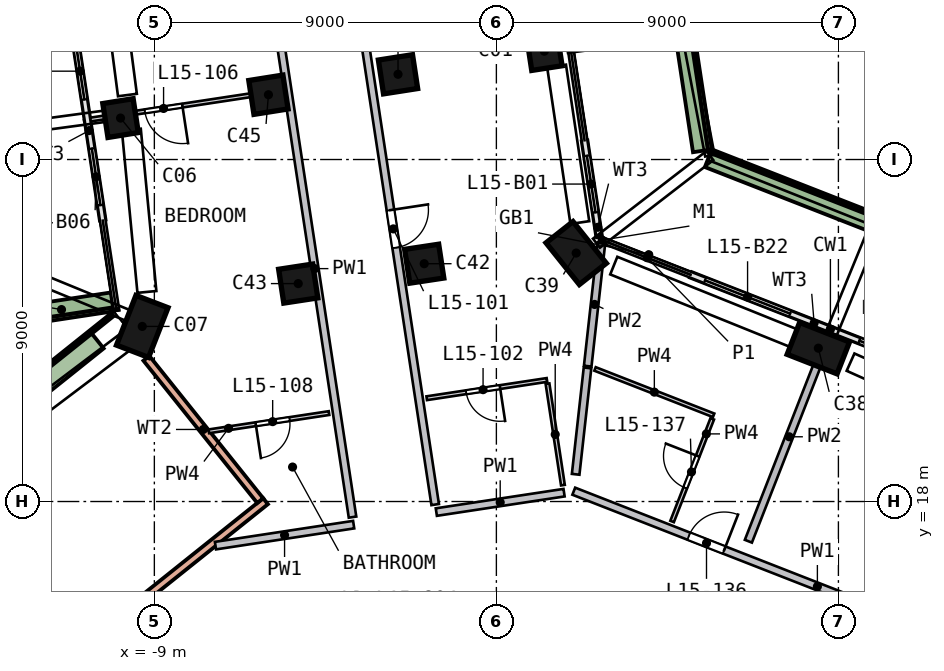
"""IFC4 building model, lengths in metres.
Left out: names, types, materials, properties, quantities, classifications, styles, units other than length and angle.
Written with IfcOpenShell. Run it as: python <this file> out.ifc"""

import sys

from ifc_helpers import new_model, si_unit, direction, frame, frame_2d, origin, origin_2d, place, context, subcontext, project, spatial, rectangle, extrude, element, fill, save


model = new_model("IFC4")
c1 = context("Model", 3, precision=1e-05, world=origin(), true_north=direction((0.0, 1.0)))
c2 = subcontext(c1, "Body", "Model", "MODEL_VIEW")
j1 = project(units=[si_unit("LENGTHUNIT", "METRE"), si_unit("PLANEANGLEUNIT", "RADIAN")], contexts=[c1])
p1 = place(None, origin())
s1 = spatial("IfcSite", under=j1, at=p1, CompositionType="ELEMENT")
p2 = place(p1, origin())
s2 = spatial("IfcBuilding", under=s1, at=p2, CompositionType="ELEMENT")
p3 = place(p2, frame((0.0, 0.0, 68.0)))
s3 = spatial("IfcBuildingStorey", under=s2, at=p3, CompositionType="ELEMENT", Elevation=68.0)
p4 = place(p3, frame((1.426, 29.891, 0.0), z_axis=(-0.13520716, -0.033347057, 0.990256026), x_axis=(-0.152178078, 0.988274013, 0.012502286)))
e1 = element("IfcColumn", 1, at=p4, inside=s3, PredefinedType="COLUMN", context=c2, shape_type="SweptSolid", body=[
    extrude(rectangle(XDim=0.9, YDim=0.8, at=origin_2d()), origin(), (0.0, 0.0, 1.0), 3.221),
])
p5 = place(p3, frame((-9.736, 28.195, 0.0), z_axis=(-0.126460455, -0.085996135, 0.988237025), x_axis=(0.158944012, -0.985120062, -0.065385514)))
e2 = element("IfcColumn", 2, at=p5, inside=s3, PredefinedType="COLUMN", context=c2, shape_type="SweptSolid", body=[
    extrude(rectangle(XDim=0.9, YDim=0.8, at=origin_2d()), origin(), (0.0, 0.0, 1.0), 3.228),
])
p6 = place(p3, frame((-9.189, 22.662, 0.0), z_axis=(-0.107334537, -0.044545353, 0.993224551), x_axis=(0.35692807, 0.930673053, 0.080312019)))
e3 = element("IfcColumn", 3, at=p6, inside=s3, PredefinedType="COLUMN", context=c2, shape_type="SweptSolid", body=[
    extrude(rectangle(XDim=1.4, YDim=0.9, at=origin_2d()), origin(), (0.0, 0.0, 1.0), 3.212),
])
p7 = place(p3, frame((8.599, 21.987, 0.0), z_axis=(-0.104949359, 0.040002437, 0.993672701), x_axis=(-0.925474949, 0.361776799, -0.112310579)))
e4 = element("IfcColumn", 4, at=p7, inside=s3, PredefinedType="COLUMN", context=c2, shape_type="SweptSolid", body=[
    extrude(rectangle(XDim=1.4, YDim=0.9, at=origin_2d()), origin(), (0.0, 0.0, 1.0), 3.21),
])
p8 = place(p3, frame((2.241, 24.527, 0.0), z_axis=(-0.116747517, 0.00972896, 0.993113974), x_axis=(0.616715127, -0.783093296, 0.080170701)))
e5 = element("IfcColumn", 5, at=p8, inside=s3, PredefinedType="COLUMN", context=c2, shape_type="SweptSolid", body=[
    extrude(rectangle(XDim=1.4, YDim=0.9, at=origin_2d()), origin(), (0.0, 0.0, 1.0), 3.212),
])
for number, where, z_axis, x_axis in (
    (6, (-1.76, 24.269, 0.0), (-0.115, -0.009, 0.993), (-0.149, 0.989, -0.008)),
    (7, (-5.078, 23.765, 0.0), (-0.113, -0.025, 0.993), (-0.151, 0.988, 0.008)),
):
    element("IfcColumn", number, at=place(p3, frame(where, z_axis=z_axis, x_axis=x_axis)), inside=s3, PredefinedType="COLUMN", context=c2, shape_type="SweptSolid", body=[
        extrude(rectangle(XDim=0.9, YDim=0.9, at=origin_2d()), origin(), (0.0, 0.0, 1.0), 3.211),
    ])
p9 = place(p3, frame((-2.428, 29.305, 0.0), z_axis=(-0.132201605, -0.051516958, 0.989883194), x_axis=(-0.154308616, 0.987542922, 0.030786825)))
e8 = element("IfcColumn", 8, at=p9, inside=s3, PredefinedType="COLUMN", context=c2, shape_type="SweptSolid", body=[
    extrude(rectangle(XDim=0.9, YDim=0.9, at=origin_2d()), origin(), (0.0, 0.0, 1.0), 3.223),
])
p10 = place(p3, frame((-5.841, 28.787, 0.0), z_axis=(-0.129544243, -0.067687056, 0.98926071), x_axis=(-0.156761028, 0.986518959, 0.046971516)))
e9 = element("IfcColumn", 9, at=p10, inside=s3, PredefinedType="COLUMN", context=c2, shape_type="SweptSolid", body=[
    extrude(rectangle(XDim=0.9, YDim=0.9, at=origin_2d()), origin(), (0.0, 0.0, 1.0), 3.225),
])
p11 = place(p3, frame((2.697, 25.017, 0.0), z_axis=(0.0, 0.0, 1.0), x_axis=(-0.150172469, 0.988659815, 0.0)))
e10 = element("IfcWall", 10, at=p11, inside=s3, PredefinedType="SOLIDWALL", context=c2, shape_type="SweptSolid", body=[
    extrude(rectangle(XDim=2.502, YDim=0.15, at=frame_2d((1.251, 0.0))), origin(), (0.0, 0.0, 1.0), 2.425),
])
p12 = place(p11, frame((0.602, 0.0, 0.0)))
e11 = element("IfcOpeningElement", 11, at=p12, cuts=e10, PredefinedType="OPENING", context=c2, shape_type="SweptSolid", body=[
    extrude(rectangle(XDim=1.5, YDim=2.4, at=frame_2d((0.75, 1.2))), frame((0.0, 0.085, 0.0), z_axis=(0.0, -1.0, 0.0), x_axis=(1.0, 0.0, 0.0)), (0.0, 0.0, 1.0), 0.17),
])
p13 = place(p3, frame((-11.127, 30.462, 0.0), z_axis=(0.0, 0.0, 1.0), x_axis=(0.150274727, -0.988644277, 0.0)))
e12 = element("IfcWall", 12, at=p13, inside=s3, PredefinedType="SOLIDWALL", context=c2, shape_type="SweptSolid", body=[
    extrude(rectangle(XDim=2.45, YDim=0.15, at=frame_2d((1.225, 0.0))), origin(), (0.0, 0.0, 1.0), 2.425),
])
p14 = place(p13, frame((0.4, 0.0, 0.0)))
e13 = element("IfcOpeningElement", 13, at=p14, cuts=e12, PredefinedType="OPENING", context=c2, shape_type="SweptSolid", body=[
    extrude(rectangle(XDim=1.5, YDim=2.4, at=frame_2d((0.75, 1.2))), frame((0.0, 0.085, 0.0), z_axis=(0.0, -1.0, 0.0), x_axis=(1.0, 0.0, 0.0)), (0.0, 0.0, 1.0), 0.17),
])
p15 = place(p3, frame((-10.759, 28.04, 0.0), z_axis=(0.0, 0.0, 1.0), x_axis=(0.150169285, -0.988660299, 0.0)))
e14 = element("IfcWall", 14, at=p15, inside=s3, PredefinedType="SOLIDWALL", context=c2, shape_type="SweptSolid", body=[
    extrude(rectangle(XDim=2.663, YDim=0.15, at=frame_2d((1.332, 0.0))), origin(), (0.0, 0.0, 1.0), 2.425),
])
p16 = place(p15, frame((0.763, 0.0, 0.0)))
e15 = element("IfcOpeningElement", 15, at=p16, cuts=e14, PredefinedType="OPENING", context=c2, shape_type="SweptSolid", body=[
    extrude(rectangle(XDim=1.5, YDim=2.4, at=frame_2d((0.75, 1.2))), frame((0.0, 0.085, 0.0), z_axis=(0.0, -1.0, 0.0), x_axis=(1.0, 0.0, 0.0)), (0.0, 0.0, 1.0), 0.17),
])
p17 = place(p3, frame((12.161, 21.211, 0.0), z_axis=(0.0, 0.0, 1.0), x_axis=(-0.931306801, 0.364235697, 0.0)))
e16 = element("IfcWall", 16, at=p17, inside=s3, PredefinedType="SOLIDWALL", context=c2, shape_type="SweptSolid", body=[
    extrude(rectangle(XDim=3.6, YDim=0.15, at=frame_2d((1.8, 0.0))), origin(), (0.0, 0.0, 1.0), 2.425),
])
p18 = place(p17, frame((0.4, 0.0, 0.0)))
e17 = element("IfcOpeningElement", 17, at=p18, cuts=e16, PredefinedType="OPENING", context=c2, shape_type="SweptSolid", body=[
    extrude(rectangle(XDim=2.4, YDim=2.4, at=frame_2d((1.2, 1.2))), frame((0.0, 0.085, 0.0), z_axis=(0.0, -1.0, 0.0), x_axis=(1.0, 0.0, 0.0)), (0.0, 0.0, 1.0), 0.17),
])
p19 = place(p3, frame((8.808, 22.522, 0.0), z_axis=(0.0, 0.0, 1.0), x_axis=(-0.931314617, 0.364215712, 0.0)))
e18 = element("IfcWall", 18, at=p19, inside=s3, PredefinedType="SOLIDWALL", context=c2, shape_type="SweptSolid", body=[
    extrude(rectangle(XDim=3.96, YDim=0.15, at=frame_2d((1.98, 0.0))), origin(), (0.0, 0.0, 1.0), 2.425),
])
p20 = place(p19, frame((1.16, 0.0, 0.0)))
e19 = element("IfcOpeningElement", 19, at=p20, cuts=e18, PredefinedType="OPENING", context=c2, shape_type="SweptSolid", body=[
    extrude(rectangle(XDim=2.4, YDim=2.4, at=frame_2d((1.2, 1.2))), frame((0.0, 0.085, 0.0), z_axis=(0.0, -1.0, 0.0), x_axis=(1.0, 0.0, 0.0)), (0.0, 0.0, 1.0), 0.17),
])
p21 = place(p3, frame((-12.777, 22.848, 0.0), z_axis=(0.0, 0.0, 1.0), x_axis=(0.988649233, 0.15024212, 0.0)))
e20 = element("IfcWall", 20, at=p21, inside=s3, PredefinedType="SOLIDWALL", context=c2, shape_type="SweptSolid", body=[
    extrude(rectangle(XDim=2.699, YDim=0.5, at=frame_2d((1.35, 0.0))), origin(), (0.0, 0.0, 1.0), 0.7),
])
p22 = place(p3, frame((15.498, 23.154, 0.0), z_axis=(0.0, 0.0, 1.0), x_axis=(-0.931310055, 0.364227375, 0.0)))
e21 = element("IfcWall", 21, at=p22, inside=s3, PredefinedType="SOLIDWALL", context=c2, shape_type="SweptSolid", body=[
    extrude(rectangle(XDim=10.652, YDim=0.5, at=frame_2d((5.326, 0.0))), origin(), (0.0, 0.0, 1.0), 0.7),
])
p23 = place(p3, frame((5.421, 27.229, 0.0), z_axis=(0.0, 0.0, 1.0), x_axis=(-0.150219629, 0.98865265, 0.0)))
e22 = element("IfcWall", 22, at=p23, inside=s3, PredefinedType="SOLIDWALL", context=c2, shape_type="SweptSolid", body=[
    extrude(rectangle(XDim=13.39, YDim=0.5, at=frame_2d((6.695, 0.0))), origin(), (0.0, 0.0, 1.0), 0.7),
])
p24 = place(p3, frame((-16.228, 9.89, 0.0), z_axis=(0.0, 0.0, 1.0), x_axis=(0.781086795, 0.624422468, 0.0)))
e23 = element("IfcWall", 23, at=p24, inside=s3, PredefinedType="SOLIDWALL", context=c2, shape_type="SweptSolid", body=[
    extrude(rectangle(XDim=13.0, YDim=0.2, at=frame_2d((6.5, 0.0))), origin(), (0.0, 0.0, 1.0), 3.19),
])
p25 = place(p24, frame((5.6, 0.0, 0.0)))
e24 = element("IfcOpeningElement", 24, at=p25, cuts=e23, PredefinedType="OPENING", context=c2, shape_type="SweptSolid", body=[
    extrude(rectangle(XDim=1.8, YDim=2.4, at=frame_2d((0.9, 1.2))), frame((0.0, 0.11, 0.0), z_axis=(0.0, -1.0, 0.0), x_axis=(1.0, 0.0, 0.0)), (0.0, 0.0, 1.0), 0.22),
])
p26 = place(p3, frame((-9.209, 21.769, 0.0), z_axis=(0.0, 0.0, 1.0), x_axis=(0.624409437, -0.781097212, 0.0)))
e25 = element("IfcWall", 25, at=p26, inside=s3, PredefinedType="SOLIDWALL", context=c2, shape_type="SweptSolid", body=[
    extrude(rectangle(XDim=4.796, YDim=0.2, at=frame_2d((2.398, 0.0))), origin(), (0.0, 0.0, 1.0), 3.19),
])
p27 = place(p3, frame((-10.102, 22.917, 0.0), z_axis=(0.0, 0.0, 1.0), x_axis=(-0.781083948, -0.624426029, 0.0)))
e26 = element("IfcWall", 26, at=p27, inside=s3, PredefinedType="SOLIDWALL", context=c2, shape_type="SweptSolid", body=[
    extrude(rectangle(XDim=12.84, YDim=0.1, at=frame_2d((6.42, 0.0))), origin(), (0.0, 0.0, 1.0), 0.7),
])
p28 = place(p3, frame((-10.49, 22.223, 0.0), z_axis=(0.0, 0.0, 1.0), x_axis=(-0.781093119, -0.624414558, 0.0)))
e27 = element("IfcWall", 27, at=p28, inside=s3, PredefinedType="SOLIDWALL", context=c2, shape_type="SweptSolid", body=[
    extrude(rectangle(XDim=4.884, YDim=0.5, at=frame_2d((2.442, 0.0))), origin(), (0.0, 0.0, 1.0), 0.7),
])
p29 = place(p3, frame((-3.755, 17.392, 0.0), z_axis=(0.0, 0.0, 1.0), x_axis=(-0.988654649, -0.150206477, 0.0)))
e28 = element("IfcWall", 28, at=p29, inside=s3, PredefinedType="SOLIDWALL", context=c2, shape_type="SweptSolid", body=[
    extrude(rectangle(XDim=3.678, YDim=0.2, at=frame_2d((1.839, 0.0))), origin(), (0.0, 0.0, 1.0), 3.19),
])
p30 = place(p3, frame((-3.785, 17.589, 0.0), z_axis=(0.0, 0.0, 1.0), x_axis=(-0.150228123, 0.98865136, 0.0)))
e29 = element("IfcWall", 29, at=p30, inside=s3, PredefinedType="SOLIDWALL", context=c2, shape_type="SweptSolid", body=[
    extrude(rectangle(XDim=21.538, YDim=0.2, at=frame_2d((10.769, 0.0))), origin(), (0.0, 0.0, 1.0), 3.19),
])
p31 = place(p30, frame((13.429, 0.0, 0.0)))
e30 = element("IfcOpeningElement", 30, at=p31, cuts=e29, PredefinedType="OPENING", context=c2, shape_type="SweptSolid", body=[
    extrude(rectangle(XDim=1.0, YDim=2.1, at=frame_2d((0.5, 1.05))), frame((0.0, 0.11, 0.0), z_axis=(0.0, -1.0, 0.0), x_axis=(1.0, 0.0, 0.0)), (0.0, 0.0, 1.0), 0.22),
])
p32 = place(p3, frame((-4.846, 39.213, 0.0), z_axis=(0.0, 0.0, 1.0), x_axis=(0.150218727, -0.988652787, 0.0)))
e31 = element("IfcWall", 31, at=p32, inside=s3, PredefinedType="SOLIDWALL", context=c2, shape_type="SweptSolid", body=[
    extrude(rectangle(XDim=21.538, YDim=0.2, at=frame_2d((10.769, 0.0))), origin(), (0.0, 0.0, 1.0), 3.19),
])
p33 = place(p32, frame((13.7, 0.0, 0.0)))
e32 = element("IfcOpeningElement", 32, at=p33, cuts=e31, PredefinedType="OPENING", context=c2, shape_type="SweptSolid", body=[
    extrude(rectangle(XDim=1.0, YDim=2.1, at=frame_2d((0.5, 1.05))), frame((0.0, 0.11, 0.0), z_axis=(0.0, -1.0, 0.0), x_axis=(1.0, 0.0, 0.0)), (0.0, 0.0, 1.0), 0.22),
])
p34 = place(p3, frame((1.781, 18.233, 0.0), z_axis=(0.0, 0.0, 1.0), x_axis=(-0.988652246, -0.150222291, 0.0)))
e33 = element("IfcWall", 33, at=p34, inside=s3, PredefinedType="SOLIDWALL", context=c2, shape_type="SweptSolid", body=[
    extrude(rectangle(XDim=3.4, YDim=0.2, at=frame_2d((1.7, 0.0))), origin(), (0.0, 0.0, 1.0), 3.19),
])
p35 = place(p3, frame((2.037, 18.271, 0.0), z_axis=(0.0, 0.0, 1.0), x_axis=(0.931315451, -0.364213578, 0.0)))
e34 = element("IfcWall", 34, at=p35, inside=s3, PredefinedType="SOLIDWALL", context=c2, shape_type="SweptSolid", body=[
    extrude(rectangle(XDim=9.316, YDim=0.2, at=frame_2d((4.658, 0.0))), origin(), (0.0, 0.0, 1.0), 3.19),
])
p36 = place(p35, frame((3.25, 0.0, 0.0)))
e35 = element("IfcOpeningElement", 35, at=p36, cuts=e34, PredefinedType="OPENING", context=c2, shape_type="SweptSolid", body=[
    extrude(rectangle(XDim=1.0, YDim=2.1, at=frame_2d((0.5, 1.05))), frame((0.0, 0.11, 0.0), z_axis=(0.0, -1.0, 0.0), x_axis=(1.0, 0.0, 0.0)), (0.0, 0.0, 1.0), 0.22),
])
p37 = place(p3, frame((2.398, 21.516, 0.0), z_axis=(0.0, 0.0, 1.0), x_axis=(-0.110735845, -0.993849874, 0.0)))
e36 = element("IfcWall", 36, at=p37, inside=s3, PredefinedType="SOLIDWALL", context=c2, shape_type="SweptSolid", body=[
    extrude(rectangle(XDim=2.818, YDim=0.2, at=frame_2d((1.409, 0.0))), origin(), (0.0, 0.0, 1.0), 3.19),
])
p38 = place(p3, frame((2.765, 24.81, 0.0), z_axis=(0.0, 0.0, 1.0), x_axis=(-0.110775855, -0.993845416, 0.0)))
e37 = element("IfcWall", 37, at=p38, inside=s3, PredefinedType="SOLIDWALL", context=c2, shape_type="SweptSolid", body=[
    extrude(rectangle(XDim=3.268, YDim=0.2, at=frame_2d((1.634, 0.0))), origin(), (0.0, 0.0, 1.0), 3.19),
])
p39 = place(p3, frame((6.631, 16.955, 0.0), z_axis=(0.0, 0.0, 1.0), x_axis=(0.36422, 0.93131294, 0.0)))
e38 = element("IfcWall", 38, at=p39, inside=s3, PredefinedType="SOLIDWALL", context=c2, shape_type="SweptSolid", body=[
    extrude(rectangle(XDim=5.903, YDim=0.2, at=frame_2d((2.951, 0.0))), origin(), (0.0, 0.0, 1.0), 3.19),
])
p40 = place(p3, frame((-5.692, 28.809, 0.0), z_axis=(0.0, 0.0, 1.0), x_axis=(-0.988655539, -0.150200614, 0.0)))
e39 = element("IfcWall", 39, at=p40, inside=s3, PredefinedType="PARTITIONING", context=c2, shape_type="SweptSolid", body=[
    extrude(rectangle(XDim=5.05, YDim=0.1, at=frame_2d((2.525, 0.0))), origin(), (0.0, 0.0, 1.0), 3.19),
])
p41 = place(p40, frame((2.6, 0.0, 0.0)))
e40 = element("IfcOpeningElement", 40, at=p41, cuts=e39, PredefinedType="OPENING", context=c2, shape_type="SweptSolid", body=[
    extrude(rectangle(XDim=1.0, YDim=2.1, at=frame_2d((0.5, 1.05))), frame((0.0, 0.06, 0.0), z_axis=(0.0, -1.0, 0.0), x_axis=(1.0, 0.0, 0.0)), (0.0, 0.0, 1.0), 0.12),
])
p42 = place(p3, frame((-4.404, 20.327, 0.0), z_axis=(0.0, 0.0, 1.0), x_axis=(-0.988657544, -0.150187422, 0.0)))
e41 = element("IfcWall", 41, at=p42, inside=s3, PredefinedType="PARTITIONING", context=c2, shape_type="SweptSolid", body=[
    extrude(rectangle(XDim=3.199, YDim=0.1, at=frame_2d((1.6, 0.0))), origin(), (0.0, 0.0, 1.0), 3.19),
])
p43 = place(p42, frame((1.05, 0.0, 0.0)))
e42 = element("IfcOpeningElement", 42, at=p43, cuts=e41, PredefinedType="OPENING", context=c2, shape_type="SweptSolid", body=[
    extrude(rectangle(XDim=0.9, YDim=2.1, at=frame_2d((0.45, 1.05))), frame((0.0, 0.06, 0.0), z_axis=(0.0, -1.0, 0.0), x_axis=(1.0, 0.0, 0.0)), (0.0, 0.0, 1.0), 0.12),
])
p44 = place(p3, frame((1.331, 21.199, 0.0), z_axis=(0.0, 0.0, 1.0), x_axis=(-0.988653098, -0.15021668, 0.0)))
e43 = element("IfcWall", 43, at=p44, inside=s3, PredefinedType="PARTITIONING", context=c2, shape_type="SweptSolid", body=[
    extrude(rectangle(XDim=3.2, YDim=0.1, at=frame_2d((1.6, 0.0))), origin(), (0.0, 0.0, 1.0), 3.19),
])
p45 = place(p44, frame((1.25, 0.0, 0.0)))
e44 = element("IfcOpeningElement", 44, at=p45, cuts=e43, PredefinedType="OPENING", context=c2, shape_type="SweptSolid", body=[
    extrude(rectangle(XDim=0.9, YDim=2.1, at=frame_2d((0.45, 1.05))), frame((0.0, 0.06, 0.0), z_axis=(0.0, -1.0, 0.0), x_axis=(1.0, 0.0, 0.0)), (0.0, 0.0, 1.0), 0.12),
])
p46 = place(p3, frame((1.345, 21.1, 0.0), z_axis=(0.0, 0.0, 1.0), x_axis=(0.150276776, -0.988643966, 0.0)))
e45 = element("IfcWall", 45, at=p46, inside=s3, PredefinedType="PARTITIONING", context=c2, shape_type="SweptSolid", body=[
    extrude(rectangle(XDim=2.7, YDim=0.1, at=frame_2d((1.35, 0.0))), origin(), (0.0, 0.0, 1.0), 3.19),
])
p47 = place(p3, frame((2.596, 21.489, 0.0), z_axis=(0.0, 0.0, 1.0), x_axis=(0.931289003, -0.364281199, 0.0)))
e46 = element("IfcWall", 46, at=p47, inside=s3, PredefinedType="PARTITIONING", context=c2, shape_type="SweptSolid", body=[
    extrude(rectangle(XDim=3.35, YDim=0.1, at=frame_2d((1.675, 0.0))), origin(), (0.0, 0.0, 1.0), 3.19),
])
p48 = place(p3, frame((4.624, 17.475, 0.0), z_axis=(0.0, 0.0, 1.0), x_axis=(0.364208877, 0.93131729, 0.0)))
e47 = element("IfcWall", 47, at=p48, inside=s3, PredefinedType="PARTITIONING", context=c2, shape_type="SweptSolid", body=[
    extrude(rectangle(XDim=2.9, YDim=0.1, at=frame_2d((1.45, 0.0))), origin(), (0.0, 0.0, 1.0), 3.19),
])
p49 = place(p48, frame((0.95, 0.0, 0.0)))
e48 = element("IfcOpeningElement", 48, at=p49, cuts=e47, PredefinedType="OPENING", context=c2, shape_type="SweptSolid", body=[
    extrude(rectangle(XDim=0.9, YDim=2.1, at=frame_2d((0.45, 1.05))), frame((0.0, 0.06, 0.0), z_axis=(0.0, -1.0, 0.0), x_axis=(1.0, 0.0, 0.0)), (0.0, 0.0, 1.0), 0.12),
])
p50 = place(p12, origin())
e49 = element("IfcDoor", 49, at=p50, inside=s3, OperationType="SLIDING_TO_LEFT", PredefinedType="DOOR", context=c2, shape_type="SweptSolid", body=[
    extrude(rectangle(XDim=1.5, YDim=2.4, at=frame_2d((0.75, 1.2))), frame((0.0, 0.025, 0.0), z_axis=(0.0, -1.0, 0.0), x_axis=(1.0, 0.0, 0.0)), (0.0, 0.0, 1.0), 0.05),
])
fill(e11, e49)
p51 = place(p14, origin())
e50 = element("IfcDoor", 50, at=p51, inside=s3, OperationType="SLIDING_TO_RIGHT", PredefinedType="DOOR", context=c2, shape_type="SweptSolid", body=[
    extrude(rectangle(XDim=1.5, YDim=2.4, at=frame_2d((0.75, 1.2))), frame((0.0, 0.025, 0.0), z_axis=(0.0, -1.0, 0.0), x_axis=(1.0, 0.0, 0.0)), (0.0, 0.0, 1.0), 0.05),
])
fill(e13, e50)
p52 = place(p16, origin())
e51 = element("IfcDoor", 51, at=p52, inside=s3, OperationType="SLIDING_TO_LEFT", PredefinedType="DOOR", context=c2, shape_type="SweptSolid", body=[
    extrude(rectangle(XDim=1.5, YDim=2.4, at=frame_2d((0.75, 1.2))), frame((0.0, 0.025, 0.0), z_axis=(0.0, -1.0, 0.0), x_axis=(1.0, 0.0, 0.0)), (0.0, 0.0, 1.0), 0.05),
])
fill(e15, e51)
p53 = place(p18, origin())
e52 = element("IfcDoor", 52, at=p53, inside=s3, OperationType="SLIDING_TO_RIGHT", PredefinedType="DOOR", context=c2, shape_type="SweptSolid", body=[
    extrude(rectangle(XDim=2.4, YDim=2.4, at=frame_2d((1.2, 1.2))), frame((0.0, 0.025, 0.0), z_axis=(0.0, -1.0, 0.0), x_axis=(1.0, 0.0, 0.0)), (0.0, 0.0, 1.0), 0.05),
])
fill(e17, e52)
p54 = place(p20, origin())
e53 = element("IfcDoor", 53, at=p54, inside=s3, OperationType="SLIDING_TO_LEFT", PredefinedType="DOOR", context=c2, shape_type="SweptSolid", body=[
    extrude(rectangle(XDim=2.4, YDim=2.4, at=frame_2d((1.2, 1.2))), frame((0.0, 0.025, 0.0), z_axis=(0.0, -1.0, 0.0), x_axis=(1.0, 0.0, 0.0)), (0.0, 0.0, 1.0), 0.05),
])
fill(e19, e53)
p55 = place(p33, origin())
e54 = element("IfcDoor", 54, at=p55, inside=s3, OperationType="SINGLE_SWING_LEFT", PredefinedType="DOOR", context=c2, shape_type="SweptSolid", body=[
    extrude(rectangle(XDim=1.0, YDim=2.1, at=frame_2d((0.5, 1.05))), frame((0.0, 0.025, 0.0), z_axis=(0.0, -1.0, 0.0), x_axis=(1.0, 0.0, 0.0)), (0.0, 0.0, 1.0), 0.05),
])
fill(e32, e54)
p56 = place(p45, origin())
e55 = element("IfcDoor", 55, at=p56, inside=s3, OperationType="SINGLE_SWING_LEFT", PredefinedType="DOOR", context=c2, shape_type="SweptSolid", body=[
    extrude(rectangle(XDim=0.9, YDim=2.1, at=frame_2d((0.45, 1.05))), frame((0.0, 0.025, 0.0), z_axis=(0.0, -1.0, 0.0), x_axis=(1.0, 0.0, 0.0)), (0.0, 0.0, 1.0), 0.05),
])
fill(e44, e55)
p57 = place(p41, origin())
e56 = element("IfcDoor", 56, at=p57, inside=s3, OperationType="SINGLE_SWING_LEFT", PredefinedType="DOOR", context=c2, shape_type="SweptSolid", body=[
    extrude(rectangle(XDim=1.0, YDim=2.1, at=frame_2d((0.5, 1.05))), frame((0.0, 0.025, 0.0), z_axis=(0.0, -1.0, 0.0), x_axis=(1.0, 0.0, 0.0)), (0.0, 0.0, 1.0), 0.05),
])
fill(e40, e56)
p58 = place(p43, origin())
e57 = element("IfcDoor", 57, at=p58, inside=s3, OperationType="SINGLE_SWING_RIGHT", PredefinedType="DOOR", context=c2, shape_type="SweptSolid", body=[
    extrude(rectangle(XDim=0.9, YDim=2.1, at=frame_2d((0.45, 1.05))), frame((0.0, 0.025, 0.0), z_axis=(0.0, -1.0, 0.0), x_axis=(1.0, 0.0, 0.0)), (0.0, 0.0, 1.0), 0.05),
])
fill(e42, e57)
p59 = place(p36, origin())
e58 = element("IfcDoor", 58, at=p59, inside=s3, OperationType="SINGLE_SWING_RIGHT", PredefinedType="DOOR", context=c2, shape_type="SweptSolid", body=[
    extrude(rectangle(XDim=1.0, YDim=2.1, at=frame_2d((0.5, 1.05))), frame((0.0, 0.025, 0.0), z_axis=(0.0, -1.0, 0.0), x_axis=(1.0, 0.0, 0.0)), (0.0, 0.0, 1.0), 0.05),
])
fill(e35, e58)
p60 = place(p49, origin())
e59 = element("IfcDoor", 59, at=p60, inside=s3, OperationType="SINGLE_SWING_RIGHT", PredefinedType="DOOR", context=c2, shape_type="SweptSolid", body=[
    extrude(rectangle(XDim=0.9, YDim=2.1, at=frame_2d((0.45, 1.05))), frame((0.0, 0.025, 0.0), z_axis=(0.0, -1.0, 0.0), x_axis=(1.0, 0.0, 0.0)), (0.0, 0.0, 1.0), 0.05),
])
fill(e48, e59)
save(model, sys.argv[1])
